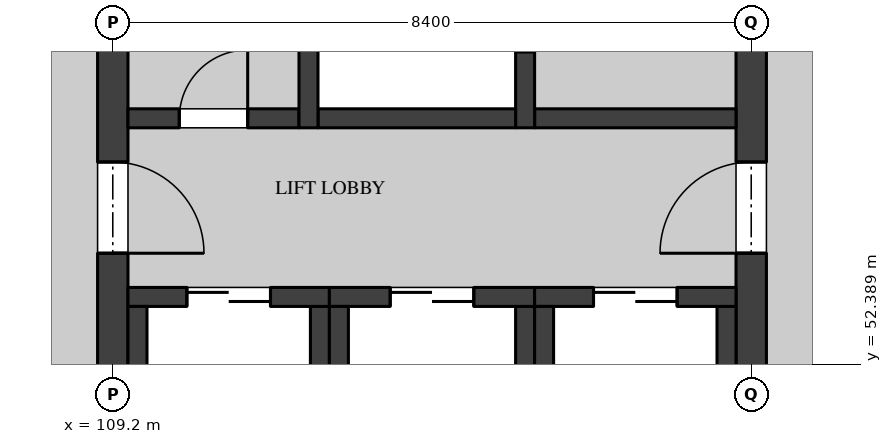
"""IFC4 building model, lengths in metres.
Left out: names, types, materials, properties, quantities, classifications, styles, units other than length and angle.
Written with IfcOpenShell. Run it as: python <this file> out.ifc"""

import sys

from ifc_helpers import new_model, si_unit, direction, frame, frame_2d, origin, place, context, subcontext, project, spatial, rectangle, extrude, element, fill, save


model = new_model("IFC4")
c1 = context("Model", 3, precision=1e-05, world=origin(), true_north=direction((0.0, 1.0)))
c2 = subcontext(c1, "Body", "Model", "MODEL_VIEW")
j1 = project(units=[si_unit("LENGTHUNIT", "METRE"), si_unit("PLANEANGLEUNIT", "RADIAN")], contexts=[c1])
p1 = place(None, origin())
s1 = spatial("IfcSite", under=j1, at=p1, CompositionType="ELEMENT")
p2 = place(p1, origin())
s2 = spatial("IfcBuilding", under=s1, at=p2, CompositionType="ELEMENT")
p3 = place(p2, frame((0.0, 0.0, 36.9)))
s3 = spatial("IfcBuildingStorey", under=s2, at=p3, CompositionType="ELEMENT", Elevation=36.9)
p4 = place(p3, frame((109.2, 50.6, 0.0), z_axis=(0.0, 0.0, 1.0), x_axis=(0.0, 1.0, 0.0)))
e1 = element("IfcWall", 1, at=p4, inside=s3, PredefinedType="SHEAR", context=c2, shape_type="SweptSolid", body=[
    extrude(rectangle(XDim=8.0, YDim=0.4, at=frame_2d((4.0, 0.0))), origin(), (0.0, 0.0, 1.0), 4.37),
])
p5 = place(p4, frame((3.25, 0.0, 0.0)))
e2 = element("IfcOpeningElement", 2, at=p5, cuts=e1, PredefinedType="OPENING", context=c2, shape_type="SweptSolid", body=[
    extrude(rectangle(XDim=1.2, YDim=2.1, at=frame_2d((0.6, 1.05))), frame((0.0, 0.21, 0.0), z_axis=(0.0, -1.0, 0.0), x_axis=(1.0, 0.0, 0.0)), (0.0, 0.0, 1.0), 0.42),
])
p6 = place(p3, frame((117.6, 50.6, 0.0), z_axis=(0.0, 0.0, 1.0), x_axis=(0.0, 1.0, 0.0)))
e3 = element("IfcWall", 3, at=p6, inside=s3, PredefinedType="SHEAR", context=c2, shape_type="SweptSolid", body=[
    extrude(rectangle(XDim=8.0, YDim=0.4, at=frame_2d((4.0, 0.0))), origin(), (0.0, 0.0, 1.0), 4.37),
])
p7 = place(p6, frame((3.25, 0.0, 0.0)))
e4 = element("IfcOpeningElement", 4, at=p7, cuts=e3, PredefinedType="OPENING", context=c2, shape_type="SweptSolid", body=[
    extrude(rectangle(XDim=1.2, YDim=2.1, at=frame_2d((0.6, 1.05))), frame((0.0, 0.21, 0.0), z_axis=(0.0, -1.0, 0.0), x_axis=(1.0, 0.0, 0.0)), (0.0, 0.0, 1.0), 0.42),
])
p8 = place(p6, frame((6.0, 0.0, 0.0)))
e5 = element("IfcOpeningElement", 5, at=p8, cuts=e3, PredefinedType="OPENING", context=c2, shape_type="SweptSolid", body=[
    extrude(rectangle(XDim=1.2, YDim=2.1, at=frame_2d((0.6, 1.05))), frame((0.0, 0.21, 0.0), z_axis=(0.0, -1.0, 0.0), x_axis=(1.0, 0.0, 0.0)), (0.0, 0.0, 1.0), 0.42),
])
p9 = place(p3, frame((109.4, 55.625, 0.0), z_axis=(0.0, 0.0, 1.0), x_axis=(1.0, 0.0, 0.0)))
e6 = element("IfcWall", 6, at=p9, inside=s3, PredefinedType="SOLIDWALL", context=c2, shape_type="SweptSolid", body=[
    extrude(rectangle(XDim=2.25, YDim=0.25, at=frame_2d((1.125, 0.0))), origin(), (0.0, 0.0, 1.0), 4.37),
])
p10 = place(p9, frame((0.675, 0.0, 0.0)))
e7 = element("IfcOpeningElement", 7, at=p10, cuts=e6, PredefinedType="OPENING", context=c2, shape_type="SweptSolid", body=[
    extrude(rectangle(XDim=0.9, YDim=2.1, at=frame_2d((0.45, 1.05))), frame((0.0, 0.135, 0.0), z_axis=(0.0, -1.0, 0.0), x_axis=(1.0, 0.0, 0.0)), (0.0, 0.0, 1.0), 0.27),
])
p11 = place(p3, frame((114.75, 55.625, 0.0), z_axis=(0.0, 0.0, 1.0), x_axis=(1.0, 0.0, 0.0)))
e8 = element("IfcWall", 8, at=p11, inside=s3, PredefinedType="SOLIDWALL", context=c2, shape_type="SweptSolid", body=[
    extrude(rectangle(XDim=2.65, YDim=0.25, at=frame_2d((1.325, 0.0))), origin(), (0.0, 0.0, 1.0), 4.37),
])
p12 = place(p3, frame((114.625, 55.5, 0.0), z_axis=(0.0, 0.0, 1.0), x_axis=(0.0, 1.0, 0.0)))
e9 = element("IfcWall", 9, at=p12, inside=s3, PredefinedType="SOLIDWALL", context=c2, shape_type="SweptSolid", body=[
    extrude(rectangle(XDim=3.1, YDim=0.25, at=frame_2d((1.55, 0.0))), origin(), (0.0, 0.0, 1.0), 4.37),
])
p13 = place(p12, frame((1.0, 0.0, 0.0)))
e10 = element("IfcOpeningElement", 10, at=p13, cuts=e9, PredefinedType="OPENING", context=c2, shape_type="SweptSolid", body=[
    extrude(rectangle(XDim=1.1, YDim=2.1, at=frame_2d((0.55, 1.05))), frame((0.0, 0.135, 0.0), z_axis=(0.0, -1.0, 0.0), x_axis=(1.0, 0.0, 0.0)), (0.0, 0.0, 1.0), 0.27),
])
p14 = place(p3, frame((111.9, 55.625, 0.0), z_axis=(0.0, 0.0, 1.0), x_axis=(1.0, 0.0, 0.0)))
e11 = element("IfcWall", 11, at=p14, inside=s3, PredefinedType="SOLIDWALL", context=c2, shape_type="SweptSolid", body=[
    extrude(rectangle(XDim=2.6, YDim=0.25, at=frame_2d((1.3, 0.0))), origin(), (0.0, 0.0, 1.0), 4.37),
])
p15 = place(p3, frame((111.775, 55.5, 0.0), z_axis=(0.0, 0.0, 1.0), x_axis=(0.0, 1.0, 0.0)))
e12 = element("IfcWall", 12, at=p15, inside=s3, PredefinedType="SOLIDWALL", context=c2, shape_type="SweptSolid", body=[
    extrude(rectangle(XDim=3.1, YDim=0.25, at=frame_2d((1.55, 0.0))), origin(), (0.0, 0.0, 1.0), 4.37),
])
p16 = place(p3, frame((111.925, 50.85, 0.0), z_axis=(0.0, 0.0, 1.0), x_axis=(0.0, 1.0, 0.0)))
e13 = element("IfcWall", 13, at=p16, inside=s3, PredefinedType="SOLIDWALL", context=c2, shape_type="SweptSolid", body=[
    extrude(rectangle(XDim=2.3, YDim=0.25, at=frame_2d((1.15, 0.0))), origin(), (0.0, 0.0, 1.0), 4.37),
])
p17 = place(p3, frame((109.4, 53.275, 0.0), z_axis=(0.0, 0.0, 1.0), x_axis=(1.0, 0.0, 0.0)))
e14 = element("IfcWall", 14, at=p17, inside=s3, PredefinedType="SOLIDWALL", context=c2, shape_type="SweptSolid", body=[
    extrude(rectangle(XDim=2.65, YDim=0.25, at=frame_2d((1.325, 0.0))), origin(), (0.0, 0.0, 1.0), 4.37),
])
p18 = place(p17, frame((0.775, 0.0, 0.0)))
e15 = element("IfcOpeningElement", 15, at=p18, cuts=e14, PredefinedType="OPENING", context=c2, shape_type="SweptSolid", body=[
    extrude(rectangle(XDim=1.1, YDim=2.1, at=frame_2d((0.55, 1.05))), frame((0.0, 0.135, 0.0), z_axis=(0.0, -1.0, 0.0), x_axis=(1.0, 0.0, 0.0)), (0.0, 0.0, 1.0), 0.27),
])
for number, where, z_axis, x_axis in (
    (16, (109.525, 50.85, 0.0), (0.0, 0.0, 1.0), (0.0, 1.0, 0.0)),
    (17, (114.625, 50.85, 0.0), (0.0, 0.0, 1.0), (0.0, 1.0, 0.0)),
):
    element("IfcWall", number, at=place(p3, frame(where, z_axis=z_axis, x_axis=x_axis)), inside=s3, PredefinedType="SOLIDWALL", context=c2, shape_type="SweptSolid", body=[
        extrude(rectangle(XDim=2.3, YDim=0.25, at=frame_2d((1.15, 0.0))), origin(), (0.0, 0.0, 1.0), 4.37),
    ])
p19 = place(p3, frame((112.05, 53.275, 0.0), z_axis=(0.0, 0.0, 1.0), x_axis=(1.0, 0.0, 0.0)))
e18 = element("IfcWall", 18, at=p19, inside=s3, PredefinedType="SOLIDWALL", context=c2, shape_type="SweptSolid", body=[
    extrude(rectangle(XDim=2.7, YDim=0.25, at=frame_2d((1.35, 0.0))), origin(), (0.0, 0.0, 1.0), 4.37),
])
p20 = place(p19, frame((0.8, 0.0, 0.0)))
e19 = element("IfcOpeningElement", 19, at=p20, cuts=e18, PredefinedType="OPENING", context=c2, shape_type="SweptSolid", body=[
    extrude(rectangle(XDim=1.1, YDim=2.1, at=frame_2d((0.55, 1.05))), frame((0.0, 0.135, 0.0), z_axis=(0.0, -1.0, 0.0), x_axis=(1.0, 0.0, 0.0)), (0.0, 0.0, 1.0), 0.27),
])
for number, where, z_axis, x_axis in (
    (20, (112.175, 50.85, 0.0), (0.0, 0.0, 1.0), (0.0, 1.0, 0.0)),
    (21, (117.275, 50.85, 0.0), (0.0, 0.0, 1.0), (0.0, 1.0, 0.0)),
):
    element("IfcWall", number, at=place(p3, frame(where, z_axis=z_axis, x_axis=x_axis)), inside=s3, PredefinedType="SOLIDWALL", context=c2, shape_type="SweptSolid", body=[
        extrude(rectangle(XDim=2.3, YDim=0.25, at=frame_2d((1.15, 0.0))), origin(), (0.0, 0.0, 1.0), 4.37),
    ])
p21 = place(p3, frame((114.75, 53.275, 0.0), z_axis=(0.0, 0.0, 1.0), x_axis=(1.0, 0.0, 0.0)))
e22 = element("IfcWall", 22, at=p21, inside=s3, PredefinedType="SOLIDWALL", context=c2, shape_type="SweptSolid", body=[
    extrude(rectangle(XDim=2.65, YDim=0.25, at=frame_2d((1.325, 0.0))), origin(), (0.0, 0.0, 1.0), 4.37),
])
p22 = place(p21, frame((0.775, 0.0, 0.0)))
e23 = element("IfcOpeningElement", 23, at=p22, cuts=e22, PredefinedType="OPENING", context=c2, shape_type="SweptSolid", body=[
    extrude(rectangle(XDim=1.1, YDim=2.1, at=frame_2d((0.55, 1.05))), frame((0.0, 0.135, 0.0), z_axis=(0.0, -1.0, 0.0), x_axis=(1.0, 0.0, 0.0)), (0.0, 0.0, 1.0), 0.27),
])
p23 = place(p3, frame((114.875, 50.85, 0.0), z_axis=(0.0, 0.0, 1.0), x_axis=(0.0, 1.0, 0.0)))
e24 = element("IfcWall", 24, at=p23, inside=s3, PredefinedType="SOLIDWALL", context=c2, shape_type="SweptSolid", body=[
    extrude(rectangle(XDim=2.3, YDim=0.25, at=frame_2d((1.15, 0.0))), origin(), (0.0, 0.0, 1.0), 4.37),
])
p24 = place(p5, frame((1.2, 0.0, 0.0), z_axis=(0.0, 0.0, 1.0), x_axis=(-1.0, 0.0, 0.0)))
e25 = element("IfcDoor", 25, at=p24, inside=s3, OperationType="SINGLE_SWING_LEFT", PredefinedType="DOOR", context=c2, shape_type="SweptSolid", body=[
    extrude(rectangle(XDim=1.2, YDim=2.1, at=frame_2d((0.6, 1.05))), frame((0.0, 0.035, 0.0), z_axis=(0.0, -1.0, 0.0), x_axis=(1.0, 0.0, 0.0)), (0.0, 0.0, 1.0), 0.07),
])
fill(e2, e25)
p25 = place(p7, origin())
e26 = element("IfcDoor", 26, at=p25, inside=s3, OperationType="SINGLE_SWING_RIGHT", PredefinedType="DOOR", context=c2, shape_type="SweptSolid", body=[
    extrude(rectangle(XDim=1.2, YDim=2.1, at=frame_2d((0.6, 1.05))), frame((0.0, 0.035, 0.0), z_axis=(0.0, -1.0, 0.0), x_axis=(1.0, 0.0, 0.0)), (0.0, 0.0, 1.0), 0.07),
])
fill(e4, e26)
p26 = place(p10, origin())
e27 = element("IfcDoor", 27, at=p26, inside=s3, OperationType="SINGLE_SWING_LEFT", PredefinedType="DOOR", context=c2, shape_type="SweptSolid", body=[
    extrude(rectangle(XDim=0.9, YDim=2.1, at=frame_2d((0.45, 1.05))), frame((0.0, 0.05, 0.0), z_axis=(0.0, -1.0, 0.0), x_axis=(1.0, 0.0, 0.0)), (0.0, 0.0, 1.0), 0.1),
])
fill(e7, e27)
p27 = place(p18, origin())
e28 = element("IfcDoor", 28, at=p27, inside=s3, OperationType="DOUBLE_DOOR_SLIDING", PredefinedType="DOOR", context=c2, shape_type="SweptSolid", body=[
    extrude(rectangle(XDim=1.1, YDim=2.1, at=frame_2d((0.55, 1.05))), frame((0.0, 0.04, 0.0), z_axis=(0.0, -1.0, 0.0), x_axis=(1.0, 0.0, 0.0)), (0.0, 0.0, 1.0), 0.08),
])
fill(e15, e28)
p28 = place(p20, origin())
e29 = element("IfcDoor", 29, at=p28, inside=s3, OperationType="DOUBLE_DOOR_SLIDING", PredefinedType="DOOR", context=c2, shape_type="SweptSolid", body=[
    extrude(rectangle(XDim=1.1, YDim=2.1, at=frame_2d((0.55, 1.05))), frame((0.0, 0.04, 0.0), z_axis=(0.0, -1.0, 0.0), x_axis=(1.0, 0.0, 0.0)), (0.0, 0.0, 1.0), 0.08),
])
fill(e19, e29)
p29 = place(p22, origin())
e30 = element("IfcDoor", 30, at=p29, inside=s3, OperationType="DOUBLE_DOOR_SLIDING", PredefinedType="DOOR", context=c2, shape_type="SweptSolid", body=[
    extrude(rectangle(XDim=1.1, YDim=2.1, at=frame_2d((0.55, 1.05))), frame((0.0, 0.04, 0.0), z_axis=(0.0, -1.0, 0.0), x_axis=(1.0, 0.0, 0.0)), (0.0, 0.0, 1.0), 0.08),
])
fill(e23, e30)
save(model, sys.argv[1])
